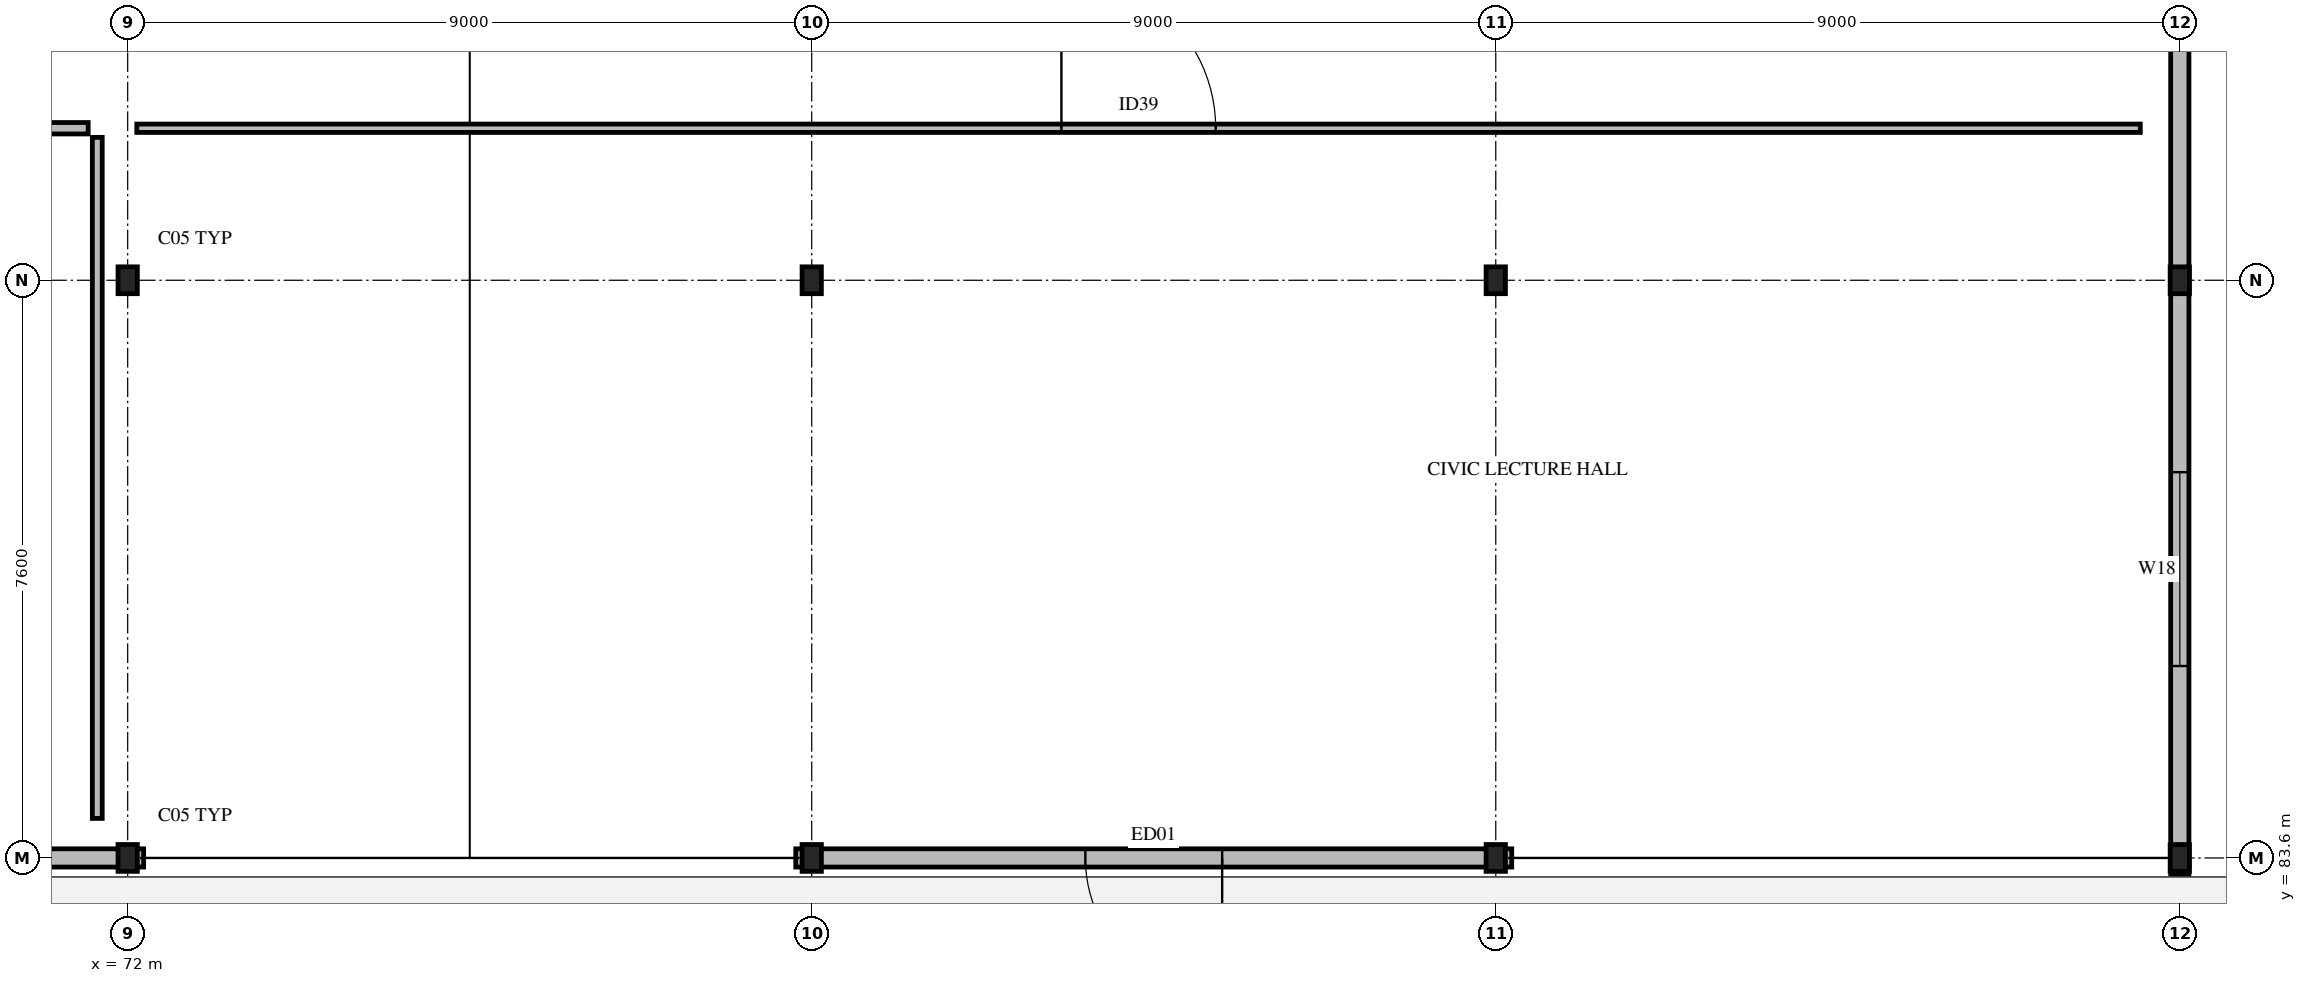
"""IFC4 building model, lengths in metres.
Left out: names, types, materials, properties, quantities, classifications, styles, units other than length and angle.
Written with IfcOpenShell. Run it as: python <this file> out.ifc"""

import sys

from ifc_helpers import new_model, si_unit, direction, frame, frame_2d, origin, origin_2d, place, context, subcontext, project, spatial, rectangle, i_section, extrude, element, fill, save


model = new_model("IFC4")
c1 = context("Model", 3, precision=1e-05, world=origin(), true_north=direction((0.0, 1.0)))
c2 = subcontext(c1, "Body", "Model", "MODEL_VIEW")
j1 = project(units=[si_unit("LENGTHUNIT", "METRE"), si_unit("PLANEANGLEUNIT", "RADIAN")], contexts=[c1])
p1 = place(None, origin())
s1 = spatial("IfcSite", under=j1, at=p1, CompositionType="ELEMENT")
p2 = place(p1, origin())
s2 = spatial("IfcBuilding", under=s1, at=p2, CompositionType="ELEMENT")
p3 = place(p2, origin())
s3 = spatial("IfcBuildingStorey", under=s2, at=p3, CompositionType="ELEMENT", Elevation=0.0)
for number, where, z_axis, x_axis in (
    (1, (72.0, 83.6, 0.0), (0.0, 0.0, 1.0), (1.0, 0.0, 0.0)),
    (2, (72.0, 91.2, 0.0), (0.0, 0.0, 1.0), (1.0, 0.0, 0.0)),
    (3, (81.0, 83.6, 0.0), (0.0, 0.0, 1.0), (1.0, 0.0, 0.0)),
    (4, (81.0, 91.2, 0.0), (0.0, 0.0, 1.0), (1.0, 0.0, 0.0)),
    (5, (90.0, 83.6, 0.0), (0.0, 0.0, 1.0), (1.0, 0.0, 0.0)),
    (6, (90.0, 91.2, 0.0), (0.0, 0.0, 1.0), (1.0, 0.0, 0.0)),
    (7, (99.0, 83.6, 0.0), (0.0, 0.0, 1.0), (1.0, 0.0, 0.0)),
    (8, (99.0, 91.2, 0.0), (0.0, 0.0, 1.0), (1.0, 0.0, 0.0)),
):
    element("IfcColumn", number, at=place(p3, frame(where, z_axis=z_axis, x_axis=x_axis)), inside=s3, PredefinedType="COLUMN", context=c2, shape_type="SweptSolid", body=[
        extrude(i_section(OverallWidth=0.254, OverallDepth=0.353, WebThickness=0.01, FlangeThickness=0.016, FilletRadius=0.015, at=origin_2d()), origin(), (0.0, 0.0, 1.0), 5.04),
    ])
p4 = place(p3, frame((62.79, 83.6, 0.0), z_axis=(0.0, 0.0, 1.0), x_axis=(1.0, 0.0, 0.0)))
e9 = element("IfcWall", 9, at=p4, inside=s3, PredefinedType="STANDARD", context=c2, shape_type="SweptSolid", body=[
    extrude(rectangle(XDim=9.42, YDim=0.24, at=frame_2d((4.71, 0.0))), origin(), (0.0, 0.0, 1.0), 4.371),
])
p5 = place(p4, frame((3.81, 0.0, 0.0)))
e10 = element("IfcOpeningElement", 10, at=p5, cuts=e9, PredefinedType="OPENING", context=c2, shape_type="SweptSolid", body=[
    extrude(rectangle(XDim=1.8, YDim=2.25, at=frame_2d((0.9, 1.125))), frame((0.0, 0.13, 0.0), z_axis=(0.0, -1.0, 0.0), x_axis=(1.0, 0.0, 0.0)), (0.0, 0.0, 1.0), 0.26),
])
p6 = place(p3, frame((80.79, 83.6, 0.0), z_axis=(0.0, 0.0, 1.0), x_axis=(1.0, 0.0, 0.0)))
e11 = element("IfcWall", 11, at=p6, inside=s3, PredefinedType="STANDARD", context=c2, shape_type="SweptSolid", body=[
    extrude(rectangle(XDim=9.42, YDim=0.24, at=frame_2d((4.71, 0.0))), origin(), (0.0, 0.0, 1.0), 4.371),
])
p7 = place(p6, frame((3.81, 0.0, 0.0)))
e12 = element("IfcOpeningElement", 12, at=p7, cuts=e11, PredefinedType="OPENING", context=c2, shape_type="SweptSolid", body=[
    extrude(rectangle(XDim=1.8, YDim=2.25, at=frame_2d((0.9, 1.125))), frame((0.0, 0.13, 0.0), z_axis=(0.0, -1.0, 0.0), x_axis=(1.0, 0.0, 0.0)), (0.0, 0.0, 1.0), 0.26),
])
p8 = place(p3, frame((99.0, 83.39, 0.0), z_axis=(0.0, 0.0, 1.0), x_axis=(0.0, 1.0, 0.0)))
e13 = element("IfcWall", 13, at=p8, inside=s3, PredefinedType="STANDARD", context=c2, shape_type="SweptSolid", body=[
    extrude(rectangle(XDim=7.81, YDim=0.24, at=frame_2d((3.905, 0.0))), origin(), (0.0, 0.0, 1.0), 4.421),
])
p9 = place(p8, frame((2.735, 0.0, 0.85)))
e14 = element("IfcOpeningElement", 14, at=p9, cuts=e13, PredefinedType="OPENING", context=c2, shape_type="SweptSolid", body=[
    extrude(rectangle(XDim=2.55, YDim=1.35, at=frame_2d((1.275, 0.675))), frame((0.0, 0.13, 0.0), z_axis=(0.0, -1.0, 0.0), x_axis=(1.0, 0.0, 0.0)), (0.0, 0.0, 1.0), 0.26),
])
p10 = place(p3, frame((99.0, 91.2, 0.0), z_axis=(0.0, 0.0, 1.0), x_axis=(0.0, 1.0, 0.0)))
e15 = element("IfcWall", 15, at=p10, inside=s3, PredefinedType="STANDARD", context=c2, shape_type="SweptSolid", body=[
    extrude(rectangle(XDim=7.6, YDim=0.24, at=frame_2d((3.8, 0.0))), origin(), (0.0, 0.0, 1.0), 4.421),
])
p11 = place(p10, frame((3.175, 0.0, 0.85)))
e16 = element("IfcOpeningElement", 16, at=p11, cuts=e15, PredefinedType="OPENING", context=c2, shape_type="SweptSolid", body=[
    extrude(rectangle(XDim=1.25, YDim=1.5, at=frame_2d((0.625, 0.75))), frame((0.0, 0.13, 0.0), z_axis=(0.0, -1.0, 0.0), x_axis=(1.0, 0.0, 0.0)), (0.0, 0.0, 1.0), 0.26),
])
p12 = place(p3, frame((54.52, 93.2, 0.0), z_axis=(0.0, 0.0, 1.0), x_axis=(1.0, 0.0, 0.0)))
e17 = element("IfcWall", 17, at=p12, inside=s3, PredefinedType="PARTITIONING", context=c2, shape_type="SweptSolid", body=[
    extrude(rectangle(XDim=16.96, YDim=0.15, at=frame_2d((8.48, 0.0))), origin(), (0.0, 0.0, 1.0), 4.76),
])
p13 = place(p12, frame((7.515, 0.0, 0.0)))
e18 = element("IfcOpeningElement", 18, at=p13, cuts=e17, PredefinedType="OPENING", context=c2, shape_type="SweptSolid", body=[
    extrude(rectangle(XDim=1.0, YDim=2.15, at=frame_2d((0.5, 1.075))), frame((0.0, 0.085, 0.0), z_axis=(0.0, -1.0, 0.0), x_axis=(1.0, 0.0, 0.0)), (0.0, 0.0, 1.0), 0.17),
])
p14 = place(p12, frame((8.79, 0.0, 0.0)))
e19 = element("IfcOpeningElement", 19, at=p14, cuts=e17, PredefinedType="OPENING", context=c2, shape_type="SweptSolid", body=[
    extrude(rectangle(XDim=1.0, YDim=2.15, at=frame_2d((0.5, 1.075))), frame((0.0, 0.085, 0.0), z_axis=(0.0, -1.0, 0.0), x_axis=(1.0, 0.0, 0.0)), (0.0, 0.0, 1.0), 0.17),
])
p15 = place(p3, frame((71.6, 84.12, 0.0), z_axis=(0.0, 0.0, 1.0), x_axis=(0.0, 1.0, 0.0)))
e20 = element("IfcWall", 20, at=p15, inside=s3, PredefinedType="PARTITIONING", context=c2, shape_type="SweptSolid", body=[
    extrude(rectangle(XDim=8.96, YDim=0.13, at=frame_2d((4.48, 0.0))), origin(), (0.0, 0.0, 1.0), 4.76),
])
p16 = place(p3, frame((72.12, 93.2, 0.0), z_axis=(0.0, 0.0, 1.0), x_axis=(1.0, 0.0, 0.0)))
e21 = element("IfcWall", 21, at=p16, inside=s3, PredefinedType="PARTITIONING", context=c2, shape_type="SweptSolid", body=[
    extrude(rectangle(XDim=26.36, YDim=0.11, at=frame_2d((13.18, 0.0))), origin(), (0.0, 0.0, 1.0), 4.76),
])
p17 = place(p16, frame((12.165, 0.0, 0.0)))
e22 = element("IfcOpeningElement", 22, at=p17, cuts=e21, PredefinedType="OPENING", context=c2, shape_type="SweptSolid", body=[
    extrude(rectangle(XDim=2.03, YDim=2.15, at=frame_2d((1.015, 1.075))), frame((0.0, 0.065, 0.0), z_axis=(0.0, -1.0, 0.0), x_axis=(1.0, 0.0, 0.0)), (0.0, 0.0, 1.0), 0.13),
])
p18 = place(p7, frame((1.8, 0.0, 0.0), z_axis=(0.0, 0.0, 1.0), x_axis=(-1.0, 0.0, 0.0)))
e23 = element("IfcDoor", 23, at=p18, inside=s3, OperationType="SINGLE_SWING_RIGHT", PredefinedType="DOOR", context=c2, shape_type="SweptSolid", body=[
    extrude(rectangle(XDim=1.8, YDim=2.25, at=frame_2d((0.9, 1.125))), frame((0.0, 0.025, 0.0), z_axis=(0.0, -1.0, 0.0), x_axis=(1.0, 0.0, 0.0)), (0.0, 0.0, 1.0), 0.05),
])
fill(e12, e23)
p19 = place(p9, origin())
e24 = element("IfcWindow", 24, at=p19, inside=s3, PartitioningType="SINGLE_PANEL", PredefinedType="WINDOW", context=c2, shape_type="SweptSolid", body=[
    extrude(rectangle(XDim=2.55, YDim=1.35, at=frame_2d((1.275, 0.675))), frame((0.0, 0.03, 0.0), z_axis=(0.0, -1.0, 0.0), x_axis=(1.0, 0.0, 0.0)), (0.0, 0.0, 1.0), 0.06),
])
fill(e14, e24)
p20 = place(p17, origin())
e25 = element("IfcDoor", 25, at=p20, inside=s3, OperationType="SINGLE_SWING_LEFT", PredefinedType="DOOR", context=c2, shape_type="SweptSolid", body=[
    extrude(rectangle(XDim=2.03, YDim=2.15, at=frame_2d((1.015, 1.075))), frame((0.0, 0.025, 0.0), z_axis=(0.0, -1.0, 0.0), x_axis=(1.0, 0.0, 0.0)), (0.0, 0.0, 1.0), 0.05),
])
fill(e22, e25)
save(model, sys.argv[1])
